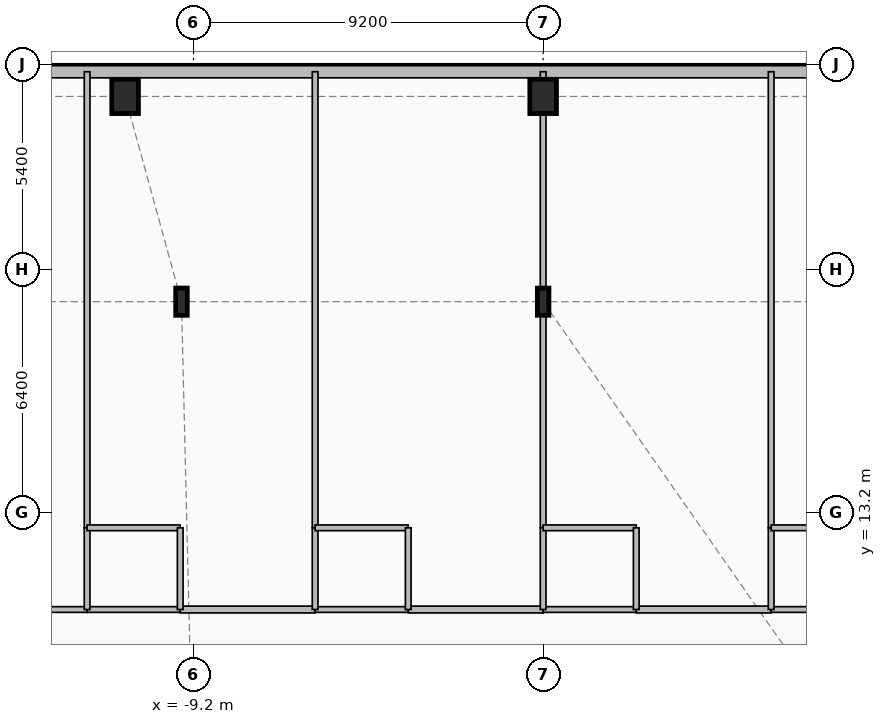
"""IFC4 building model, lengths in metres.
Left out: names, types, materials, properties, quantities, classifications, styles, units other than length and angle.
Written with IfcOpenShell. Run it as: python <this file> out.ifc"""

import sys

from ifc_helpers import new_model, si_unit, direction, frame, frame_2d, origin, origin_2d, place, context, subcontext, project, spatial, rectangle, i_section, extrude, element, fill, save


model = new_model("IFC4")
c1 = context("Model", 3, precision=1e-05, world=origin(), true_north=direction((0.0, 1.0)))
c2 = subcontext(c1, "Body", "Model", "MODEL_VIEW")
j1 = project(units=[si_unit("LENGTHUNIT", "METRE"), si_unit("PLANEANGLEUNIT", "RADIAN")], contexts=[c1])
p1 = place(None, origin())
s1 = spatial("IfcSite", under=j1, at=p1, CompositionType="ELEMENT")
p2 = place(p1, origin())
s2 = spatial("IfcBuilding", under=s1, at=p2, CompositionType="ELEMENT")
p3 = place(p2, frame((0.0, 0.0, 22.5)))
s3 = spatial("IfcBuildingStorey", under=s2, at=p3, CompositionType="ELEMENT", Elevation=22.5)
for number, where, z_axis, x_axis in (
    (1, (-11.0, 24.15, 0.0), (0.0, 0.0, 1.0), (1.0, 0.0, 0.0)),
    (2, (0.0, 24.15, 0.0), (0.0, 0.0, 1.0), (1.0, 0.0, 0.0)),
):
    element("IfcColumn", number, at=place(p3, frame(where, z_axis=z_axis, x_axis=x_axis)), inside=s3, PredefinedType="COLUMN", context=c2, shape_type="SweptSolid", body=[
        extrude(rectangle(XDim=0.7, YDim=0.9, at=origin_2d()), origin(), (0.0, 0.0, 1.0), 4.5),
    ])
for number, where, z_axis, x_axis in (
    (3, (0.0, 18.75, 0.0), (0.0, 0.0, 1.0), (1.0, 0.0, 0.0)),
    (4, (-9.517, 18.75, 0.0), (0.0, 0.0, 1.0), (1.0, 0.0, 0.0)),
):
    element("IfcColumn", number, at=place(p3, frame(where, z_axis=z_axis, x_axis=x_axis)), inside=s3, PredefinedType="COLUMN", context=c2, shape_type="SweptSolid", body=[
        extrude(i_section(OverallWidth=0.304, OverallDepth=0.716, WebThickness=0.021, FlangeThickness=0.04, FilletRadius=0.027, at=origin_2d()), origin(), (0.0, 0.0, 1.0), 4.5),
    ])
p4 = place(p3, frame((-36.8, 24.8, 0.0), z_axis=(0.0, 0.0, 1.0), x_axis=(1.0, 0.0, 0.0)))
e5 = element("IfcWall", 5, at=p4, inside=s3, PredefinedType="SOLIDWALL", context=c2, shape_type="SweptSolid", body=[
    extrude(rectangle(XDim=73.6, YDim=0.32, at=frame_2d((36.8, 0.0))), origin(), (0.0, 0.0, 1.0), 4.16),
])
p5 = place(p4, frame((1.079, 0.0, 0.85)))
e6 = element("IfcOpeningElement", 6, at=p5, cuts=e5, PredefinedType="OPENING", context=c2, shape_type="SweptSolid", body=[
    extrude(rectangle(XDim=2.3, YDim=2.4, at=frame_2d((1.15, 1.2))), frame((0.0, 0.17, 0.0), z_axis=(0.0, -1.0, 0.0), x_axis=(1.0, 0.0, 0.0)), (0.0, 0.0, 1.0), 0.34),
])
p6 = place(p4, frame((8.431, 0.0, 0.85)))
e7 = element("IfcOpeningElement", 7, at=p6, cuts=e5, PredefinedType="OPENING", context=c2, shape_type="SweptSolid", body=[
    extrude(rectangle(XDim=2.6, YDim=2.4, at=frame_2d((1.3, 1.2))), frame((0.0, 0.17, 0.0), z_axis=(0.0, -1.0, 0.0), x_axis=(1.0, 0.0, 0.0)), (0.0, 0.0, 1.0), 0.34),
])
p7 = place(p4, frame((13.316, 0.0, 0.85)))
e8 = element("IfcOpeningElement", 8, at=p7, cuts=e5, PredefinedType="OPENING", context=c2, shape_type="SweptSolid", body=[
    extrude(rectangle(XDim=1.1, YDim=1.85, at=frame_2d((0.55, 0.925))), frame((0.0, 0.17, 0.0), z_axis=(0.0, -1.0, 0.0), x_axis=(1.0, 0.0, 0.0)), (0.0, 0.0, 1.0), 0.34),
])
p8 = place(p4, frame((16.339, 0.0, 0.85)))
e9 = element("IfcOpeningElement", 9, at=p8, cuts=e5, PredefinedType="OPENING", context=c2, shape_type="SweptSolid", body=[
    extrude(rectangle(XDim=2.0, YDim=2.4, at=frame_2d((1.0, 1.2))), frame((0.0, 0.17, 0.0), z_axis=(0.0, -1.0, 0.0), x_axis=(1.0, 0.0, 0.0)), (0.0, 0.0, 1.0), 0.34),
])
p9 = place(p4, frame((21.875, 0.0, 0.85)))
e10 = element("IfcOpeningElement", 10, at=p9, cuts=e5, PredefinedType="OPENING", context=c2, shape_type="SweptSolid", body=[
    extrude(rectangle(XDim=2.3, YDim=2.4, at=frame_2d((1.15, 1.2))), frame((0.0, 0.17, 0.0), z_axis=(0.0, -1.0, 0.0), x_axis=(1.0, 0.0, 0.0)), (0.0, 0.0, 1.0), 0.34),
])
p10 = place(p4, frame((26.53, 0.0, 0.85)))
e11 = element("IfcOpeningElement", 11, at=p10, cuts=e5, PredefinedType="OPENING", context=c2, shape_type="SweptSolid", body=[
    extrude(rectangle(XDim=2.6, YDim=2.4, at=frame_2d((1.3, 1.2))), frame((0.0, 0.17, 0.0), z_axis=(0.0, -1.0, 0.0), x_axis=(1.0, 0.0, 0.0)), (0.0, 0.0, 1.0), 0.34),
])
p11 = place(p4, frame((32.537, 0.0, 0.85)))
e12 = element("IfcOpeningElement", 12, at=p11, cuts=e5, PredefinedType="OPENING", context=c2, shape_type="SweptSolid", body=[
    extrude(rectangle(XDim=2.6, YDim=2.4, at=frame_2d((1.3, 1.2))), frame((0.0, 0.17, 0.0), z_axis=(0.0, -1.0, 0.0), x_axis=(1.0, 0.0, 0.0)), (0.0, 0.0, 1.0), 0.34),
])
p12 = place(p4, frame((38.543, 0.0, 0.85)))
e13 = element("IfcOpeningElement", 13, at=p12, cuts=e5, PredefinedType="OPENING", context=c2, shape_type="SweptSolid", body=[
    extrude(rectangle(XDim=2.6, YDim=2.4, at=frame_2d((1.3, 1.2))), frame((0.0, 0.17, 0.0), z_axis=(0.0, -1.0, 0.0), x_axis=(1.0, 0.0, 0.0)), (0.0, 0.0, 1.0), 0.34),
])
p13 = place(p4, frame((44.55, 0.0, 0.85)))
e14 = element("IfcOpeningElement", 14, at=p13, cuts=e5, PredefinedType="OPENING", context=c2, shape_type="SweptSolid", body=[
    extrude(rectangle(XDim=2.6, YDim=2.4, at=frame_2d((1.3, 1.2))), frame((0.0, 0.17, 0.0), z_axis=(0.0, -1.0, 0.0), x_axis=(1.0, 0.0, 0.0)), (0.0, 0.0, 1.0), 0.34),
])
p14 = place(p4, frame((50.556, 0.0, 0.85)))
e15 = element("IfcOpeningElement", 15, at=p14, cuts=e5, PredefinedType="OPENING", context=c2, shape_type="SweptSolid", body=[
    extrude(rectangle(XDim=2.6, YDim=2.4, at=frame_2d((1.3, 1.2))), frame((0.0, 0.17, 0.0), z_axis=(0.0, -1.0, 0.0), x_axis=(1.0, 0.0, 0.0)), (0.0, 0.0, 1.0), 0.34),
])
p15 = place(p4, frame((55.341, 0.0, 0.85)))
e16 = element("IfcOpeningElement", 16, at=p15, cuts=e5, PredefinedType="OPENING", context=c2, shape_type="SweptSolid", body=[
    extrude(rectangle(XDim=2.0, YDim=2.4, at=frame_2d((1.0, 1.2))), frame((0.0, 0.17, 0.0), z_axis=(0.0, -1.0, 0.0), x_axis=(1.0, 0.0, 0.0)), (0.0, 0.0, 1.0), 0.34),
])
p16 = place(p4, frame((59.16, 0.0, 0.85)))
e17 = element("IfcOpeningElement", 17, at=p16, cuts=e5, PredefinedType="OPENING", context=c2, shape_type="SweptSolid", body=[
    extrude(rectangle(XDim=1.1, YDim=1.85, at=frame_2d((0.55, 0.925))), frame((0.0, 0.17, 0.0), z_axis=(0.0, -1.0, 0.0), x_axis=(1.0, 0.0, 0.0)), (0.0, 0.0, 1.0), 0.34),
])
p17 = place(p4, frame((62.649, 0.0, 0.85)))
e18 = element("IfcOpeningElement", 18, at=p17, cuts=e5, PredefinedType="OPENING", context=c2, shape_type="SweptSolid", body=[
    extrude(rectangle(XDim=2.6, YDim=2.4, at=frame_2d((1.3, 1.2))), frame((0.0, 0.17, 0.0), z_axis=(0.0, -1.0, 0.0), x_axis=(1.0, 0.0, 0.0)), (0.0, 0.0, 1.0), 0.34),
])
p18 = place(p4, frame((70.301, 0.0, 0.85)))
e19 = element("IfcOpeningElement", 19, at=p18, cuts=e5, PredefinedType="OPENING", context=c2, shape_type="SweptSolid", body=[
    extrude(rectangle(XDim=2.3, YDim=2.4, at=frame_2d((1.15, 1.2))), frame((0.0, 0.17, 0.0), z_axis=(0.0, -1.0, 0.0), x_axis=(1.0, 0.0, 0.0)), (0.0, 0.0, 1.0), 0.34),
])
p19 = place(p3, frame((-15.65, 10.65, 0.0), z_axis=(0.0, 0.0, 1.0), x_axis=(1.0, 0.0, 0.0)))
e20 = element("IfcWall", 20, at=p19, inside=s3, PredefinedType="PARTITIONING", context=c2, shape_type="SweptSolid", body=[
    extrude(rectangle(XDim=3.65, YDim=0.15, at=frame_2d((1.825, 0.0))), origin(), (0.0, 0.0, 1.0), 4.16),
])
p20 = place(p19, frame((1.157, 0.0, 0.0)))
e21 = element("IfcOpeningElement", 21, at=p20, cuts=e20, PredefinedType="OPENING", context=c2, shape_type="SweptSolid", body=[
    extrude(rectangle(XDim=0.95, YDim=2.1, at=frame_2d((0.475, 1.05))), frame((0.0, 0.085, 0.0), z_axis=(0.0, -1.0, 0.0), x_axis=(1.0, 0.0, 0.0)), (0.0, 0.0, 1.0), 0.17),
])
p21 = place(p3, frame((-9.55, 10.65, 0.0), z_axis=(0.0, 0.0, 1.0), x_axis=(1.0, 0.0, 0.0)))
e22 = element("IfcWall", 22, at=p21, inside=s3, PredefinedType="PARTITIONING", context=c2, shape_type="SweptSolid", body=[
    extrude(rectangle(XDim=3.55, YDim=0.18, at=frame_2d((1.775, 0.0))), origin(), (0.0, 0.0, 1.0), 4.16),
])
p22 = place(p21, frame((1.796, 0.0, 0.0)))
e23 = element("IfcOpeningElement", 23, at=p22, cuts=e22, PredefinedType="OPENING", context=c2, shape_type="SweptSolid", body=[
    extrude(rectangle(XDim=1.0, YDim=2.15, at=frame_2d((0.5, 1.075))), frame((0.0, 0.1, 0.0), z_axis=(0.0, -1.0, 0.0), x_axis=(1.0, 0.0, 0.0)), (0.0, 0.0, 1.0), 0.2),
])
p23 = place(p3, frame((-12.0, 10.65, 0.0), z_axis=(0.0, 0.0, 1.0), x_axis=(1.0, 0.0, 0.0)))
e24 = element("IfcWall", 24, at=p23, inside=s3, PredefinedType="PLUMBINGWALL", context=c2, shape_type="SweptSolid", body=[
    extrude(rectangle(XDim=2.45, YDim=0.15, at=frame_2d((1.225, 0.0))), origin(), (0.0, 0.0, 1.0), 4.16),
])
p24 = place(p3, frame((-3.55, 10.65, 0.0), z_axis=(0.0, 0.0, 1.0), x_axis=(1.0, 0.0, 0.0)))
e25 = element("IfcWall", 25, at=p24, inside=s3, PredefinedType="PARTITIONING", context=c2, shape_type="SweptSolid", body=[
    extrude(rectangle(XDim=3.55, YDim=0.18, at=frame_2d((1.775, 0.0))), origin(), (0.0, 0.0, 1.0), 4.16),
])
p25 = place(p24, frame((1.275, 0.0, 0.0)))
e26 = element("IfcOpeningElement", 26, at=p25, cuts=e25, PredefinedType="OPENING", context=c2, shape_type="SweptSolid", body=[
    extrude(rectangle(XDim=1.0, YDim=2.15, at=frame_2d((0.5, 1.075))), frame((0.0, 0.1, 0.0), z_axis=(0.0, -1.0, 0.0), x_axis=(1.0, 0.0, 0.0)), (0.0, 0.0, 1.0), 0.2),
])
p26 = place(p3, frame((-6.0, 10.65, 0.0), z_axis=(0.0, 0.0, 1.0), x_axis=(1.0, 0.0, 0.0)))
e27 = element("IfcWall", 27, at=p26, inside=s3, PredefinedType="PLUMBINGWALL", context=c2, shape_type="SweptSolid", body=[
    extrude(rectangle(XDim=2.45, YDim=0.15, at=frame_2d((1.225, 0.0))), origin(), (0.0, 0.0, 1.0), 4.16),
])
p27 = place(p3, frame((2.45, 10.65, 0.0), z_axis=(0.0, 0.0, 1.0), x_axis=(1.0, 0.0, 0.0)))
e28 = element("IfcWall", 28, at=p27, inside=s3, PredefinedType="PARTITIONING", context=c2, shape_type="SweptSolid", body=[
    extrude(rectangle(XDim=3.55, YDim=0.18, at=frame_2d((1.775, 0.0))), origin(), (0.0, 0.0, 1.0), 4.16),
])
p28 = place(p27, frame((0.754, 0.0, 0.0)))
e29 = element("IfcOpeningElement", 29, at=p28, cuts=e28, PredefinedType="OPENING", context=c2, shape_type="SweptSolid", body=[
    extrude(rectangle(XDim=1.0, YDim=2.15, at=frame_2d((0.5, 1.075))), frame((0.0, 0.1, 0.0), z_axis=(0.0, -1.0, 0.0), x_axis=(1.0, 0.0, 0.0)), (0.0, 0.0, 1.0), 0.2),
])
for number, where, z_axis, x_axis in (
    (30, (0.0, 10.65, 0.0), (0.0, 0.0, 1.0), (1.0, 0.0, 0.0)),
    (31, (6.0, 10.65, 0.0), (0.0, 0.0, 1.0), (1.0, 0.0, 0.0)),
):
    element("IfcWall", number, at=place(p3, frame(where, z_axis=z_axis, x_axis=x_axis)), inside=s3, PredefinedType="PLUMBINGWALL", context=c2, shape_type="SweptSolid", body=[
        extrude(rectangle(XDim=2.45, YDim=0.15, at=frame_2d((1.225, 0.0))), origin(), (0.0, 0.0, 1.0), 4.16),
    ])
p29 = place(p3, frame((-12.0, 24.8, 0.0), z_axis=(0.0, 0.0, 1.0), x_axis=(0.0, -1.0, 0.0)))
e32 = element("IfcWall", 32, at=p29, inside=s3, PredefinedType="PARTITIONING", context=c2, shape_type="SweptSolid", body=[
    extrude(rectangle(XDim=12.0, YDim=0.15, at=frame_2d((6.0, 0.0))), origin(), (0.0, 0.0, 1.0), 4.16),
])
p30 = place(p3, frame((-12.0, 12.8, 0.0), z_axis=(0.0, 0.0, 1.0), x_axis=(0.0, -1.0, 0.0)))
e33 = element("IfcWall", 33, at=p30, inside=s3, PredefinedType="PLUMBINGWALL", context=c2, shape_type="SweptSolid", body=[
    extrude(rectangle(XDim=2.15, YDim=0.15, at=frame_2d((1.075, 0.0))), origin(), (0.0, 0.0, 1.0), 4.16),
])
p31 = place(p3, frame((-9.55, 12.8, 0.0), z_axis=(0.0, 0.0, 1.0), x_axis=(-1.0, 0.0, 0.0)))
e34 = element("IfcWall", 34, at=p31, inside=s3, PredefinedType="PLUMBINGWALL", context=c2, shape_type="SweptSolid", body=[
    extrude(rectangle(XDim=2.45, YDim=0.15, at=frame_2d((1.225, 0.0))), origin(), (0.0, 0.0, 1.0), 4.16),
])
p32 = place(p31, frame((0.921, 0.0, 0.0)))
e35 = element("IfcOpeningElement", 35, at=p32, cuts=e34, PredefinedType="OPENING", context=c2, shape_type="SweptSolid", body=[
    extrude(rectangle(XDim=0.9, YDim=2.1, at=frame_2d((0.45, 1.05))), frame((0.0, 0.085, 0.0), z_axis=(0.0, -1.0, 0.0), x_axis=(1.0, 0.0, 0.0)), (0.0, 0.0, 1.0), 0.17),
])
p33 = place(p3, frame((-9.55, 10.65, 0.0), z_axis=(0.0, 0.0, 1.0), x_axis=(0.0, 1.0, 0.0)))
e36 = element("IfcWall", 36, at=p33, inside=s3, PredefinedType="PLUMBINGWALL", context=c2, shape_type="SweptSolid", body=[
    extrude(rectangle(XDim=2.15, YDim=0.15, at=frame_2d((1.075, 0.0))), origin(), (0.0, 0.0, 1.0), 3.645),
])
p34 = place(p3, frame((-6.0, 24.8, 0.0), z_axis=(0.0, 0.0, 1.0), x_axis=(0.0, -1.0, 0.0)))
e37 = element("IfcWall", 37, at=p34, inside=s3, PredefinedType="PARTITIONING", context=c2, shape_type="SweptSolid", body=[
    extrude(rectangle(XDim=12.0, YDim=0.15, at=frame_2d((6.0, 0.0))), origin(), (0.0, 0.0, 1.0), 4.16),
])
p35 = place(p3, frame((-6.0, 12.8, 0.0), z_axis=(0.0, 0.0, 1.0), x_axis=(0.0, -1.0, 0.0)))
e38 = element("IfcWall", 38, at=p35, inside=s3, PredefinedType="PLUMBINGWALL", context=c2, shape_type="SweptSolid", body=[
    extrude(rectangle(XDim=2.15, YDim=0.15, at=frame_2d((1.075, 0.0))), origin(), (0.0, 0.0, 1.0), 4.16),
])
p36 = place(p3, frame((-3.55, 12.8, 0.0), z_axis=(0.0, 0.0, 1.0), x_axis=(-1.0, 0.0, 0.0)))
e39 = element("IfcWall", 39, at=p36, inside=s3, PredefinedType="PLUMBINGWALL", context=c2, shape_type="SweptSolid", body=[
    extrude(rectangle(XDim=2.45, YDim=0.15, at=frame_2d((1.225, 0.0))), origin(), (0.0, 0.0, 1.0), 4.16),
])
p37 = place(p36, frame((0.775, 0.0, 0.0)))
e40 = element("IfcOpeningElement", 40, at=p37, cuts=e39, PredefinedType="OPENING", context=c2, shape_type="SweptSolid", body=[
    extrude(rectangle(XDim=0.9, YDim=2.1, at=frame_2d((0.45, 1.05))), frame((0.0, 0.085, 0.0), z_axis=(0.0, -1.0, 0.0), x_axis=(1.0, 0.0, 0.0)), (0.0, 0.0, 1.0), 0.17),
])
p38 = place(p3, frame((-3.55, 10.65, 0.0), z_axis=(0.0, 0.0, 1.0), x_axis=(0.0, 1.0, 0.0)))
e41 = element("IfcWall", 41, at=p38, inside=s3, PredefinedType="PLUMBINGWALL", context=c2, shape_type="SweptSolid", body=[
    extrude(rectangle(XDim=2.15, YDim=0.15, at=frame_2d((1.075, 0.0))), origin(), (0.0, 0.0, 1.0), 4.16),
])
p39 = place(p3, frame((0.0, 24.8, 0.0), z_axis=(0.0, 0.0, 1.0), x_axis=(0.0, -1.0, 0.0)))
e42 = element("IfcWall", 42, at=p39, inside=s3, PredefinedType="PARTITIONING", context=c2, shape_type="SweptSolid", body=[
    extrude(rectangle(XDim=12.0, YDim=0.15, at=frame_2d((6.0, 0.0))), origin(), (0.0, 0.0, 1.0), 3.545),
])
p40 = place(p3, frame((0.0, 12.8, 0.0), z_axis=(0.0, 0.0, 1.0), x_axis=(0.0, -1.0, 0.0)))
e43 = element("IfcWall", 43, at=p40, inside=s3, PredefinedType="PLUMBINGWALL", context=c2, shape_type="SweptSolid", body=[
    extrude(rectangle(XDim=2.15, YDim=0.15, at=frame_2d((1.075, 0.0))), origin(), (0.0, 0.0, 1.0), 4.16),
])
p41 = place(p3, frame((2.45, 12.8, 0.0), z_axis=(0.0, 0.0, 1.0), x_axis=(-1.0, 0.0, 0.0)))
e44 = element("IfcWall", 44, at=p41, inside=s3, PredefinedType="PLUMBINGWALL", context=c2, shape_type="SweptSolid", body=[
    extrude(rectangle(XDim=2.45, YDim=0.15, at=frame_2d((1.225, 0.0))), origin(), (0.0, 0.0, 1.0), 4.16),
])
p42 = place(p41, frame((0.629, 0.0, 0.0)))
e45 = element("IfcOpeningElement", 45, at=p42, cuts=e44, PredefinedType="OPENING", context=c2, shape_type="SweptSolid", body=[
    extrude(rectangle(XDim=0.9, YDim=2.1, at=frame_2d((0.45, 1.05))), frame((0.0, 0.085, 0.0), z_axis=(0.0, -1.0, 0.0), x_axis=(1.0, 0.0, 0.0)), (0.0, 0.0, 1.0), 0.17),
])
p43 = place(p3, frame((2.45, 10.65, 0.0), z_axis=(0.0, 0.0, 1.0), x_axis=(0.0, 1.0, 0.0)))
e46 = element("IfcWall", 46, at=p43, inside=s3, PredefinedType="PLUMBINGWALL", context=c2, shape_type="SweptSolid", body=[
    extrude(rectangle(XDim=2.15, YDim=0.15, at=frame_2d((1.075, 0.0))), origin(), (0.0, 0.0, 1.0), 4.16),
])
p44 = place(p3, frame((6.0, 24.8, 0.0), z_axis=(0.0, 0.0, 1.0), x_axis=(0.0, -1.0, 0.0)))
e47 = element("IfcWall", 47, at=p44, inside=s3, PredefinedType="PARTITIONING", context=c2, shape_type="SweptSolid", body=[
    extrude(rectangle(XDim=12.0, YDim=0.15, at=frame_2d((6.0, 0.0))), origin(), (0.0, 0.0, 1.0), 4.16),
])
p45 = place(p3, frame((6.0, 12.8, 0.0), z_axis=(0.0, 0.0, 1.0), x_axis=(0.0, -1.0, 0.0)))
e48 = element("IfcWall", 48, at=p45, inside=s3, PredefinedType="PLUMBINGWALL", context=c2, shape_type="SweptSolid", body=[
    extrude(rectangle(XDim=2.15, YDim=0.15, at=frame_2d((1.075, 0.0))), origin(), (0.0, 0.0, 1.0), 4.16),
])
p46 = place(p3, frame((8.45, 12.8, 0.0), z_axis=(0.0, 0.0, 1.0), x_axis=(-1.0, 0.0, 0.0)))
e49 = element("IfcWall", 49, at=p46, inside=s3, PredefinedType="PLUMBINGWALL", context=c2, shape_type="SweptSolid", body=[
    extrude(rectangle(XDim=2.45, YDim=0.15, at=frame_2d((1.225, 0.0))), origin(), (0.0, 0.0, 1.0), 4.16),
])
p47 = place(p46, frame((0.921, 0.0, 0.0)))
e50 = element("IfcOpeningElement", 50, at=p47, cuts=e49, PredefinedType="OPENING", context=c2, shape_type="SweptSolid", body=[
    extrude(rectangle(XDim=0.9, YDim=2.1, at=frame_2d((0.45, 1.05))), frame((0.0, 0.085, 0.0), z_axis=(0.0, -1.0, 0.0), x_axis=(1.0, 0.0, 0.0)), (0.0, 0.0, 1.0), 0.17),
])
p48 = place(p9, origin())
e51 = element("IfcWindow", 51, at=p48, inside=s3, PartitioningType="SINGLE_PANEL", PredefinedType="WINDOW", context=c2, shape_type="SweptSolid", body=[
    extrude(rectangle(XDim=2.3, YDim=2.4, at=frame_2d((1.15, 1.2))), frame((0.0, 0.03, 0.0), z_axis=(0.0, -1.0, 0.0), x_axis=(1.0, 0.0, 0.0)), (0.0, 0.0, 1.0), 0.06),
])
fill(e10, e51)
p49 = place(p10, origin())
e52 = element("IfcWindow", 52, at=p49, inside=s3, PartitioningType="SINGLE_PANEL", PredefinedType="WINDOW", context=c2, shape_type="SweptSolid", body=[
    extrude(rectangle(XDim=2.6, YDim=2.4, at=frame_2d((1.3, 1.2))), frame((0.0, 0.03, 0.0), z_axis=(0.0, -1.0, 0.0), x_axis=(1.0, 0.0, 0.0)), (0.0, 0.0, 1.0), 0.06),
])
fill(e11, e52)
p50 = place(p11, origin())
e53 = element("IfcWindow", 53, at=p50, inside=s3, PartitioningType="SINGLE_PANEL", PredefinedType="WINDOW", context=c2, shape_type="SweptSolid", body=[
    extrude(rectangle(XDim=2.6, YDim=2.4, at=frame_2d((1.3, 1.2))), frame((0.0, 0.03, 0.0), z_axis=(0.0, -1.0, 0.0), x_axis=(1.0, 0.0, 0.0)), (0.0, 0.0, 1.0), 0.06),
])
fill(e12, e53)
p51 = place(p12, origin())
e54 = element("IfcWindow", 54, at=p51, inside=s3, PartitioningType="SINGLE_PANEL", PredefinedType="WINDOW", context=c2, shape_type="SweptSolid", body=[
    extrude(rectangle(XDim=2.6, YDim=2.4, at=frame_2d((1.3, 1.2))), frame((0.0, 0.03, 0.0), z_axis=(0.0, -1.0, 0.0), x_axis=(1.0, 0.0, 0.0)), (0.0, 0.0, 1.0), 0.06),
])
fill(e13, e54)
p52 = place(p22, origin())
e55 = element("IfcDoor", 55, at=p52, inside=s3, OperationType="SINGLE_SWING_LEFT", PredefinedType="DOOR", context=c2, shape_type="SweptSolid", body=[
    extrude(rectangle(XDim=1.0, YDim=2.15, at=frame_2d((0.5, 1.075))), frame((0.0, 0.025, 0.0), z_axis=(0.0, -1.0, 0.0), x_axis=(1.0, 0.0, 0.0)), (0.0, 0.0, 1.0), 0.05),
])
fill(e23, e55)
p53 = place(p25, origin())
e56 = element("IfcDoor", 56, at=p53, inside=s3, OperationType="SINGLE_SWING_RIGHT", PredefinedType="DOOR", context=c2, shape_type="SweptSolid", body=[
    extrude(rectangle(XDim=1.0, YDim=2.15, at=frame_2d((0.5, 1.075))), frame((0.0, 0.025, 0.0), z_axis=(0.0, -1.0, 0.0), x_axis=(1.0, 0.0, 0.0)), (0.0, 0.0, 1.0), 0.05),
])
fill(e26, e56)
p54 = place(p28, origin())
e57 = element("IfcDoor", 57, at=p54, inside=s3, OperationType="SINGLE_SWING_LEFT", PredefinedType="DOOR", context=c2, shape_type="SweptSolid", body=[
    extrude(rectangle(XDim=1.0, YDim=2.15, at=frame_2d((0.5, 1.075))), frame((0.0, 0.025, 0.0), z_axis=(0.0, -1.0, 0.0), x_axis=(1.0, 0.0, 0.0)), (0.0, 0.0, 1.0), 0.05),
])
fill(e29, e57)
p55 = place(p32, origin())
e58 = element("IfcDoor", 58, at=p55, inside=s3, OperationType="SINGLE_SWING_RIGHT", PredefinedType="DOOR", context=c2, shape_type="SweptSolid", body=[
    extrude(rectangle(XDim=0.9, YDim=2.1, at=frame_2d((0.45, 1.05))), frame((0.0, 0.025, 0.0), z_axis=(0.0, -1.0, 0.0), x_axis=(1.0, 0.0, 0.0)), (0.0, 0.0, 1.0), 0.05),
])
fill(e35, e58)
p56 = place(p37, origin())
e59 = element("IfcDoor", 59, at=p56, inside=s3, OperationType="SINGLE_SWING_LEFT", PredefinedType="DOOR", context=c2, shape_type="SweptSolid", body=[
    extrude(rectangle(XDim=0.9, YDim=2.1, at=frame_2d((0.45, 1.05))), frame((0.0, 0.025, 0.0), z_axis=(0.0, -1.0, 0.0), x_axis=(1.0, 0.0, 0.0)), (0.0, 0.0, 1.0), 0.05),
])
fill(e40, e59)
p57 = place(p42, origin())
e60 = element("IfcDoor", 60, at=p57, inside=s3, OperationType="SINGLE_SWING_RIGHT", PredefinedType="DOOR", context=c2, shape_type="SweptSolid", body=[
    extrude(rectangle(XDim=0.9, YDim=2.1, at=frame_2d((0.45, 1.05))), frame((0.0, 0.025, 0.0), z_axis=(0.0, -1.0, 0.0), x_axis=(1.0, 0.0, 0.0)), (0.0, 0.0, 1.0), 0.05),
])
fill(e45, e60)
p58 = place(p47, origin())
e61 = element("IfcDoor", 61, at=p58, inside=s3, OperationType="SINGLE_SWING_LEFT", PredefinedType="DOOR", context=c2, shape_type="SweptSolid", body=[
    extrude(rectangle(XDim=0.9, YDim=2.1, at=frame_2d((0.45, 1.05))), frame((0.0, 0.025, 0.0), z_axis=(0.0, -1.0, 0.0), x_axis=(1.0, 0.0, 0.0)), (0.0, 0.0, 1.0), 0.05),
])
fill(e50, e61)
save(model, sys.argv[1])
